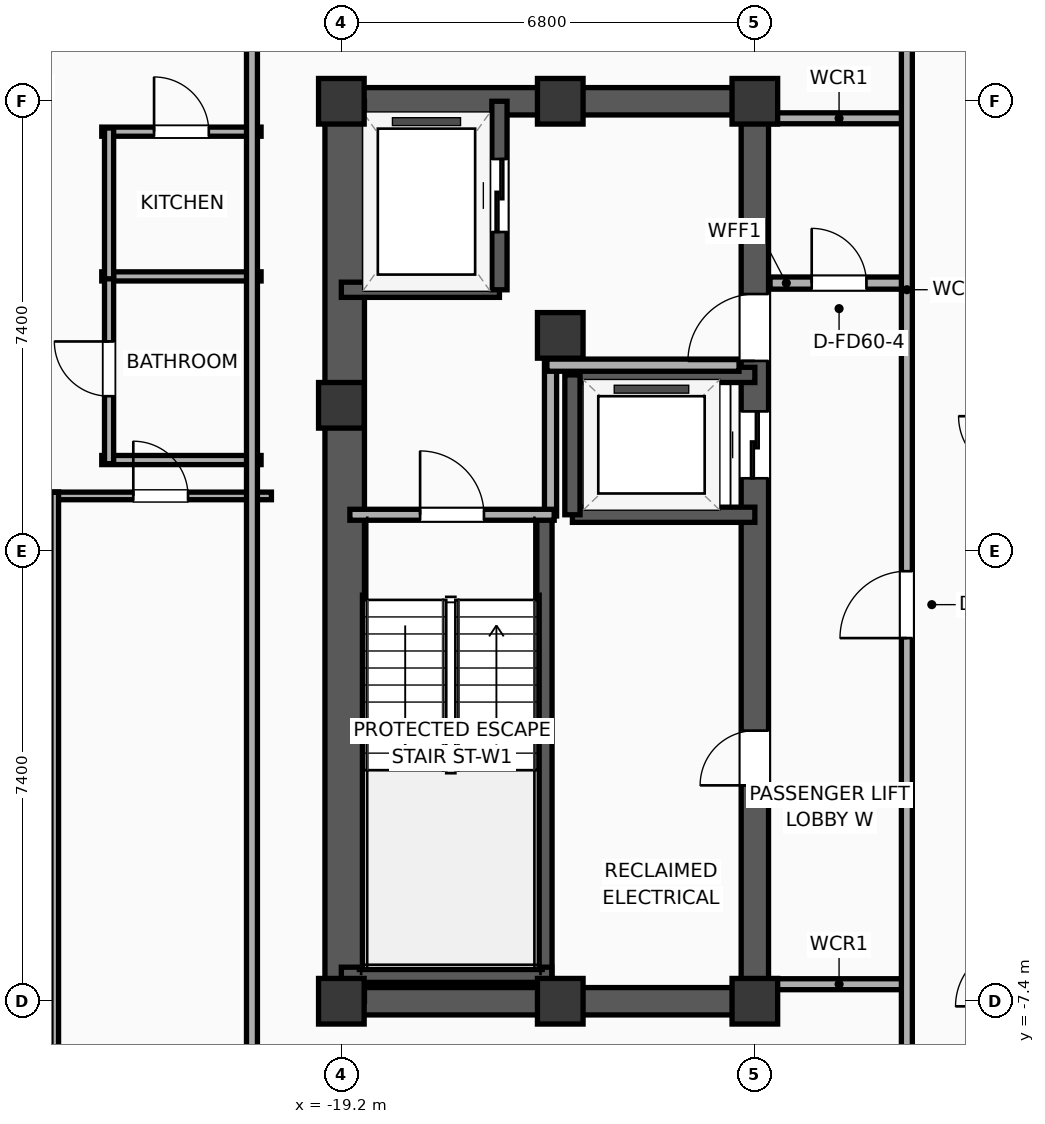
"""IFC4 building model, lengths in metres.
Left out: names, types, materials, properties, quantities, classifications, styles, units other than length and angle.
Written with IfcOpenShell. Run it as: python <this file> out.ifc"""

import sys

from ifc_helpers import new_model, si_unit, direction, frame, frame_2d, origin, origin_2d, place, context, subcontext, project, spatial, rectangle, extrude, element, fill, save


model = new_model("IFC4")
c1 = context("Model", 3, precision=1e-05, world=origin(), true_north=direction((0.0, 1.0)))
c2 = subcontext(c1, "Body", "Model", "MODEL_VIEW")
j1 = project(units=[si_unit("LENGTHUNIT", "METRE"), si_unit("PLANEANGLEUNIT", "RADIAN")], contexts=[c1])
p1 = place(None, origin())
s1 = spatial("IfcSite", under=j1, at=p1, CompositionType="ELEMENT")
p2 = place(p1, origin())
s2 = spatial("IfcBuilding", under=s1, at=p2, CompositionType="ELEMENT")
p3 = place(p2, frame((0.0, 0.0, 267.8)))
s3 = spatial("IfcBuildingStorey", under=s2, at=p3, CompositionType="ELEMENT", Elevation=267.8)
for number, where, z_axis, x_axis in (
    (1, (-19.2, -7.4, 0.0), (0.0, 0.0, 1.0), (1.0, 0.0, 0.0)),
    (2, (-19.2, 2.4, 0.0), (0.0, 0.0, 1.0), (1.0, 0.0, 0.0)),
    (3, (-19.2, 7.4, 0.0), (0.0, 0.0, 1.0), (1.0, 0.0, 0.0)),
    (4, (-15.6, -7.4, 0.0), (0.0, 0.0, 1.0), (1.0, 0.0, 0.0)),
    (5, (-15.6, 7.4, 0.0), (0.0, 0.0, 1.0), (1.0, 0.0, 0.0)),
    (6, (-12.4, -7.4, 0.0), (0.0, 0.0, 1.0), (1.0, 0.0, 0.0)),
    (7, (-15.6, 3.55, 0.0), (0.0, 0.0, 1.0), (1.0, 0.0, 0.0)),
    (8, (-12.4, 7.4, 0.0), (0.0, 0.0, 1.0), (1.0, 0.0, 0.0)),
):
    element("IfcColumn", number, at=place(p3, frame(where, z_axis=z_axis, x_axis=x_axis)), inside=s3, PredefinedType="COLUMN", context=c2, shape_type="SweptSolid", body=[
        extrude(rectangle(XDim=0.75, YDim=0.75, at=origin_2d()), origin(), (0.0, 0.0, 1.0), 3.9),
    ])
for number, where, z_axis, x_axis in (
    (9, (-19.425, -7.4, 0.0), (0.0, 0.0, 1.0), (1.0, 0.0, 0.0)),
    (10, (-19.425, 7.4, 0.0), (0.0, 0.0, 1.0), (1.0, 0.0, 0.0)),
):
    element("IfcWall", number, at=place(p3, frame(where, z_axis=z_axis, x_axis=x_axis)), inside=s3, PredefinedType="SHEAR", context=c2, shape_type="SweptSolid", body=[
        extrude(rectangle(XDim=7.25, YDim=0.45, at=frame_2d((3.625, 0.0))), origin(), (0.0, 0.0, 1.0), 3.65),
    ])
p4 = place(p3, frame((-19.145, -7.4, 0.0), z_axis=(0.0, 0.0, 1.0), x_axis=(0.0, 1.0, 0.0)))
e11 = element("IfcWall", 11, at=p4, inside=s3, PredefinedType="SHEAR", context=c2, shape_type="SweptSolid", body=[
    extrude(rectangle(XDim=14.8, YDim=0.65, at=frame_2d((7.4, 0.0))), origin(), (0.0, 0.0, 1.0), 3.65),
])
p5 = place(p3, frame((-12.4, -7.4, 0.0), z_axis=(0.0, 0.0, 1.0), x_axis=(0.0, 1.0, 0.0)))
e12 = element("IfcWall", 12, at=p5, inside=s3, PredefinedType="SHEAR", context=c2, shape_type="SweptSolid", body=[
    extrude(rectangle(XDim=14.8, YDim=0.45, at=frame_2d((7.4, 0.0))), origin(), (0.0, 0.0, 1.0), 3.65),
])
p6 = place(p5, frame((8.6, 0.0, 0.0)))
e13 = element("IfcOpeningElement", 13, at=p6, cuts=e12, PredefinedType="OPENING", context=c2, shape_type="SweptSolid", body=[
    extrude(rectangle(XDim=1.1, YDim=2.05, at=frame_2d((0.55, 1.025))), frame((0.0, 0.235, 0.0), z_axis=(0.0, -1.0, 0.0), x_axis=(1.0, 0.0, 0.0)), (0.0, 0.0, 1.0), 0.47),
])
p7 = place(p5, frame((10.53, 0.0, 0.0)))
e14 = element("IfcOpeningElement", 14, at=p7, cuts=e12, PredefinedType="OPENING", context=c2, shape_type="SweptSolid", body=[
    extrude(rectangle(XDim=1.1, YDim=2.05, at=frame_2d((0.55, 1.025))), frame((0.0, 0.235, 0.0), z_axis=(0.0, -1.0, 0.0), x_axis=(1.0, 0.0, 0.0)), (0.0, 0.0, 1.0), 0.47),
])
p8 = place(p5, frame((3.55, 0.0, 0.0)))
e15 = element("IfcOpeningElement", 15, at=p8, cuts=e12, PredefinedType="OPENING", context=c2, shape_type="SweptSolid", body=[
    extrude(rectangle(XDim=0.9, YDim=2.05, at=frame_2d((0.45, 1.025))), frame((0.0, 0.235, 0.0), z_axis=(0.0, -1.0, 0.0), x_axis=(1.0, 0.0, 0.0)), (0.0, 0.0, 1.0), 0.47),
])
p9 = place(p3, frame((-15.86, -7.085, 0.0), z_axis=(0.0, 0.0, 1.0), x_axis=(0.0, 1.0, 0.0)))
e16 = element("IfcWall", 16, at=p9, inside=s3, PredefinedType="SOLIDWALL", context=c2, shape_type="SweptSolid", body=[
    extrude(rectangle(XDim=7.685, YDim=0.25, at=frame_2d((3.843, 0.0))), origin(), (0.0, 0.0, 1.0), 3.65),
])
p10 = place(p3, frame((-19.2, -6.965, 0.0), z_axis=(0.0, 0.0, 1.0), x_axis=(1.0, 0.0, 0.0)))
e17 = element("IfcWall", 17, at=p10, inside=s3, PredefinedType="SOLIDWALL", context=c2, shape_type="SweptSolid", body=[
    extrude(rectangle(XDim=3.46, YDim=0.25, at=frame_2d((1.73, 0.0))), origin(), (0.0, 0.0, 1.0), 3.65),
])
p11 = place(p3, frame((-19.2, 4.3, 0.0), z_axis=(0.0, 0.0, 1.0), x_axis=(1.0, 0.0, 0.0)))
e18 = element("IfcWall", 18, at=p11, inside=s3, PredefinedType="SOLIDWALL", context=c2, shape_type="SweptSolid", body=[
    extrude(rectangle(XDim=2.6, YDim=0.25, at=frame_2d((1.3, 0.0))), origin(), (0.0, 0.0, 1.0), 3.65),
])
p12 = place(p3, frame((-16.6, 4.3, 0.0), z_axis=(0.0, 0.0, 1.0), x_axis=(0.0, 1.0, 0.0)))
e19 = element("IfcWall", 19, at=p12, inside=s3, PredefinedType="SOLIDWALL", context=c2, shape_type="SweptSolid", body=[
    extrude(rectangle(XDim=3.1, YDim=0.25, at=frame_2d((1.55, 0.0))), origin(), (0.0, 0.0, 1.0), 3.65),
])
p13 = place(p12, frame((0.95, 0.0, 0.0)))
e20 = element("IfcOpeningElement", 20, at=p13, cuts=e19, PredefinedType="OPENING", context=c2, shape_type="SweptSolid", body=[
    extrude(rectangle(XDim=1.2, YDim=2.05, at=frame_2d((0.6, 1.025))), frame((0.0, 0.135, 0.0), z_axis=(0.0, -1.0, 0.0), x_axis=(1.0, 0.0, 0.0)), (0.0, 0.0, 1.0), 0.27),
])
for number, where, z_axis, x_axis in (
    (21, (-15.4, 0.6, 0.0), (0.0, 0.0, 1.0), (1.0, 0.0, 0.0)),
    (22, (-12.4, 2.9, 0.0), (0.0, 0.0, 1.0), (-1.0, 0.0, 0.0)),
):
    element("IfcWall", number, at=place(p3, frame(where, z_axis=z_axis, x_axis=x_axis)), inside=s3, PredefinedType="SOLIDWALL", context=c2, shape_type="SweptSolid", body=[
        extrude(rectangle(XDim=3.0, YDim=0.25, at=frame_2d((1.5, 0.0))), origin(), (0.0, 0.0, 1.0), 3.65),
    ])
p14 = place(p3, frame((-15.4, 2.9, 0.0), z_axis=(0.0, 0.0, 1.0), x_axis=(0.0, -1.0, 0.0)))
e23 = element("IfcWall", 23, at=p14, inside=s3, PredefinedType="SOLIDWALL", context=c2, shape_type="SweptSolid", body=[
    extrude(rectangle(XDim=2.3, YDim=0.25, at=frame_2d((1.15, 0.0))), origin(), (0.0, 0.0, 1.0), 3.65),
])
p15 = place(p3, frame((-15.76, 0.58, 0.0), z_axis=(0.0, 0.0, 1.0), x_axis=(0.0, 1.0, 0.0)))
e24 = element("IfcWall", 24, at=p15, inside=s3, PredefinedType="PARTITIONING", context=c2, shape_type="SweptSolid", body=[
    extrude(rectangle(XDim=2.52, YDim=0.2, at=frame_2d((1.26, 0.0))), origin(), (0.0, 0.0, 1.0), 3.65),
])
p16 = place(p3, frame((-15.82, 3.06, 0.0), z_axis=(0.0, 0.0, 1.0), x_axis=(1.0, 0.0, 0.0)))
e25 = element("IfcWall", 25, at=p16, inside=s3, PredefinedType="PARTITIONING", context=c2, shape_type="SweptSolid", body=[
    extrude(rectangle(XDim=3.16, YDim=0.2, at=frame_2d((1.58, 0.0))), origin(), (0.0, 0.0, 1.0), 3.65),
])
p17 = place(p3, frame((-19.06, 0.6, 0.0), z_axis=(0.0, 0.0, 1.0), x_axis=(1.0, 0.0, 0.0)))
e26 = element("IfcWall", 26, at=p17, inside=s3, PredefinedType="PARTITIONING", context=c2, shape_type="SweptSolid", body=[
    extrude(rectangle(XDim=3.36, YDim=0.18, at=frame_2d((1.68, 0.0))), origin(), (0.0, 0.0, 1.0), 3.65),
])
p18 = place(p17, frame((1.155, 0.0, 0.0)))
e27 = element("IfcOpeningElement", 27, at=p18, cuts=e26, PredefinedType="OPENING", context=c2, shape_type="SweptSolid", body=[
    extrude(rectangle(XDim=1.05, YDim=2.05, at=frame_2d((0.525, 1.025))), frame((0.0, 0.1, 0.0), z_axis=(0.0, -1.0, 0.0), x_axis=(1.0, 0.0, 0.0)), (0.0, 0.0, 1.0), 0.2),
])
p19 = place(p3, frame((-12.15, 4.41, 0.0), z_axis=(0.0, 0.0, 1.0), x_axis=(1.0, 0.0, 0.0)))
e28 = element("IfcWall", 28, at=p19, inside=s3, PredefinedType="PARTITIONING", context=c2, shape_type="SweptSolid", body=[
    extrude(rectangle(XDim=2.27, YDim=0.2, at=frame_2d((1.135, 0.0))), origin(), (0.0, 0.0, 1.0), 3.65),
])
p20 = place(p19, frame((0.685, 0.0, 0.0)))
e29 = element("IfcOpeningElement", 29, at=p20, cuts=e28, PredefinedType="OPENING", context=c2, shape_type="SweptSolid", body=[
    extrude(rectangle(XDim=0.9, YDim=2.05, at=frame_2d((0.45, 1.025))), frame((0.0, 0.11, 0.0), z_axis=(0.0, -1.0, 0.0), x_axis=(1.0, 0.0, 0.0)), (0.0, 0.0, 1.0), 0.22),
])
for number, where, z_axis, x_axis in (
    (30, (-12.15, 7.12, 0.0), (0.0, 0.0, 1.0), (1.0, 0.0, 0.0)),
    (31, (-12.15, -7.12, 0.0), (0.0, 0.0, 1.0), (1.0, 0.0, 0.0)),
):
    element("IfcWall", number, at=place(p3, frame(where, z_axis=z_axis, x_axis=x_axis)), inside=s3, PredefinedType="PARTITIONING", context=c2, shape_type="SweptSolid", body=[
        extrude(rectangle(XDim=2.27, YDim=0.18, at=frame_2d((1.135, 0.0))), origin(), (0.0, 0.0, 1.0), 3.65),
    ])
p21 = place(p3, frame((-9.9, -8.78, 0.0), z_axis=(0.0, 0.0, 1.0), x_axis=(0.0, 1.0, 0.0)))
e32 = element("IfcWall", 32, at=p21, inside=s3, PredefinedType="PARTITIONING", context=c2, shape_type="SweptSolid", body=[
    extrude(rectangle(XDim=17.56, YDim=0.18, at=frame_2d((8.78, 0.0))), origin(), (0.0, 0.0, 1.0), 3.65),
])
p22 = place(p21, frame((7.352, 0.0, 0.0)))
e33 = element("IfcOpeningElement", 33, at=p22, cuts=e32, PredefinedType="OPENING", context=c2, shape_type="SweptSolid", body=[
    extrude(rectangle(XDim=1.1, YDim=2.05, at=frame_2d((0.55, 1.025))), frame((0.0, 0.1, 0.0), z_axis=(0.0, -1.0, 0.0), x_axis=(1.0, 0.0, 0.0)), (0.0, 0.0, 1.0), 0.2),
])
p23 = place(p3, frame((-23.14, 6.9, 0.0), z_axis=(0.0, 0.0, 1.0), x_axis=(1.0, 0.0, 0.0)))
e34 = element("IfcWall", 34, at=p23, inside=s3, PredefinedType="PLUMBINGWALL", context=c2, shape_type="SweptSolid", body=[
    extrude(rectangle(XDim=2.62, YDim=0.15, at=frame_2d((1.31, 0.0))), origin(), (0.0, 0.0, 1.0), 3.65),
])
p24 = place(p23, frame((0.86, 0.0, 0.0)))
e35 = element("IfcOpeningElement", 35, at=p24, cuts=e34, PredefinedType="OPENING", context=c2, shape_type="SweptSolid", body=[
    extrude(rectangle(XDim=0.9, YDim=2.05, at=frame_2d((0.45, 1.025))), frame((0.0, 0.085, 0.0), z_axis=(0.0, -1.0, 0.0), x_axis=(1.0, 0.0, 0.0)), (0.0, 0.0, 1.0), 0.17),
])
for number, where, z_axis, x_axis in (
    (36, (-23.14, 4.52, 0.0), (0.0, 0.0, 1.0), (1.0, 0.0, 0.0)),
    (37, (-23.14, 1.5, 0.0), (0.0, 0.0, 1.0), (1.0, 0.0, 0.0)),
):
    element("IfcWall", number, at=place(p3, frame(where, z_axis=z_axis, x_axis=x_axis)), inside=s3, PredefinedType="PLUMBINGWALL", context=c2, shape_type="SweptSolid", body=[
        extrude(rectangle(XDim=2.62, YDim=0.15, at=frame_2d((1.31, 0.0))), origin(), (0.0, 0.0, 1.0), 3.65),
    ])
p25 = place(p3, frame((-23.02, 1.44, 0.0), z_axis=(0.0, 0.0, 1.0), x_axis=(0.0, 1.0, 0.0)))
e38 = element("IfcWall", 38, at=p25, inside=s3, PredefinedType="PLUMBINGWALL", context=c2, shape_type="SweptSolid", body=[
    extrude(rectangle(XDim=3.12, YDim=0.15, at=frame_2d((1.56, 0.0))), origin(), (0.0, 0.0, 1.0), 3.65),
])
p26 = place(p25, frame((1.11, 0.0, 0.0)))
e39 = element("IfcOpeningElement", 39, at=p26, cuts=e38, PredefinedType="OPENING", context=c2, shape_type="SweptSolid", body=[
    extrude(rectangle(XDim=0.9, YDim=2.05, at=frame_2d((0.45, 1.025))), frame((0.0, 0.085, 0.0), z_axis=(0.0, -1.0, 0.0), x_axis=(1.0, 0.0, 0.0)), (0.0, 0.0, 1.0), 0.17),
])
p27 = place(p3, frame((-23.02, 4.48, 0.0), z_axis=(0.0, 0.0, 1.0), x_axis=(0.0, 1.0, 0.0)))
e40 = element("IfcWall", 40, at=p27, inside=s3, PredefinedType="PLUMBINGWALL", context=c2, shape_type="SweptSolid", body=[
    extrude(rectangle(XDim=2.48, YDim=0.15, at=frame_2d((1.24, 0.0))), origin(), (0.0, 0.0, 1.0), 3.65),
])
p28 = place(p3, frame((-27.219, 0.91, 0.0), z_axis=(0.0, 0.0, 1.0), x_axis=(1.0, 0.0, 0.0)))
e41 = element("IfcWall", 41, at=p28, inside=s3, PredefinedType="PARTITIONING", context=c2, shape_type="SweptSolid", body=[
    extrude(rectangle(XDim=3.368, YDim=0.125, at=frame_2d((1.684, 0.0))), origin(), (0.0, 0.0, 1.0), 3.65),
])
p29 = place(p28, frame((1.234, 0.0, 0.0)))
e42 = element("IfcOpeningElement", 42, at=p29, cuts=e41, PredefinedType="OPENING", context=c2, shape_type="SweptSolid", body=[
    extrude(rectangle(XDim=0.9, YDim=2.05, at=frame_2d((0.45, 1.025))), frame((0.0, 0.073, 0.0), z_axis=(0.0, -1.0, 0.0), x_axis=(1.0, 0.0, 0.0)), (0.0, 0.0, 1.0), 0.145),
])
p30 = place(p3, frame((-23.976, 0.91, 0.0), z_axis=(0.0, 0.0, 1.0), x_axis=(1.0, 0.0, 0.0)))
e43 = element("IfcWall", 43, at=p30, inside=s3, PredefinedType="PARTITIONING", context=c2, shape_type="SweptSolid", body=[
    extrude(rectangle(XDim=3.625, YDim=0.125, at=frame_2d((1.813, 0.0))), origin(), (0.0, 0.0, 1.0), 3.65),
])
p31 = place(p30, frame((1.354, 0.0, 0.0)))
e44 = element("IfcOpeningElement", 44, at=p31, cuts=e43, PredefinedType="OPENING", context=c2, shape_type="SweptSolid", body=[
    extrude(rectangle(XDim=0.9, YDim=2.05, at=frame_2d((0.45, 1.025))), frame((0.0, 0.073, 0.0), z_axis=(0.0, -1.0, 0.0), x_axis=(1.0, 0.0, 0.0)), (0.0, 0.0, 1.0), 0.145),
])
p32 = place(p3, frame((-23.913, -9.01, 0.0), z_axis=(0.0, 0.0, 1.0), x_axis=(0.0, 1.0, 0.0)))
e45 = element("IfcWall", 45, at=p32, inside=s3, PredefinedType="PARTITIONING", context=c2, shape_type="SweptSolid", body=[
    extrude(rectangle(XDim=9.98, YDim=0.125, at=frame_2d((4.99, 0.0))), origin(), (0.0, 0.0, 1.0), 3.65),
])
p33 = place(p3, frame((-20.67, -8.81, 0.0), z_axis=(0.0, 0.0, 1.0), x_axis=(0.0, 1.0, 0.0)))
e46 = element("IfcWall", 46, at=p33, inside=s3, PredefinedType="PARTITIONING", context=c2, shape_type="SweptSolid", body=[
    extrude(rectangle(XDim=17.62, YDim=0.18, at=frame_2d((8.81, 0.0))), origin(), (0.0, 0.0, 1.0), 3.65),
])
p34 = place(p13, origin())
e47 = element("IfcDoor", 47, at=p34, inside=s3, OperationType="SLIDING_TO_LEFT", PredefinedType="DOOR", context=c2, shape_type="SweptSolid", body=[
    extrude(rectangle(XDim=1.2, YDim=2.05, at=frame_2d((0.6, 1.025))), frame((0.0, 0.025, 0.0), z_axis=(0.0, -1.0, 0.0), x_axis=(1.0, 0.0, 0.0)), (0.0, 0.0, 1.0), 0.05),
])
fill(e20, e47)
p35 = place(p6, origin())
e48 = element("IfcDoor", 48, at=p35, inside=s3, OperationType="SLIDING_TO_LEFT", PredefinedType="DOOR", context=c2, shape_type="SweptSolid", body=[
    extrude(rectangle(XDim=1.1, YDim=2.05, at=frame_2d((0.55, 1.025))), frame((0.0, 0.025, 0.0), z_axis=(0.0, -1.0, 0.0), x_axis=(1.0, 0.0, 0.0)), (0.0, 0.0, 1.0), 0.05),
])
fill(e13, e48)
p36 = place(p18, origin())
e49 = element("IfcDoor", 49, at=p36, inside=s3, OperationType="SINGLE_SWING_LEFT", PredefinedType="DOOR", context=c2, shape_type="SweptSolid", body=[
    extrude(rectangle(XDim=1.05, YDim=2.05, at=frame_2d((0.525, 1.025))), frame((0.0, 0.025, 0.0), z_axis=(0.0, -1.0, 0.0), x_axis=(1.0, 0.0, 0.0)), (0.0, 0.0, 1.0), 0.05),
])
fill(e27, e49)
p37 = place(p20, origin())
e50 = element("IfcDoor", 50, at=p37, inside=s3, OperationType="SINGLE_SWING_LEFT", PredefinedType="DOOR", context=c2, shape_type="SweptSolid", body=[
    extrude(rectangle(XDim=0.9, YDim=2.05, at=frame_2d((0.45, 1.025))), frame((0.0, 0.025, 0.0), z_axis=(0.0, -1.0, 0.0), x_axis=(1.0, 0.0, 0.0)), (0.0, 0.0, 1.0), 0.05),
])
fill(e29, e50)
p38 = place(p22, origin())
e51 = element("IfcDoor", 51, at=p38, inside=s3, OperationType="SINGLE_SWING_LEFT", PredefinedType="DOOR", context=c2, shape_type="SweptSolid", body=[
    extrude(rectangle(XDim=1.1, YDim=2.05, at=frame_2d((0.55, 1.025))), frame((0.0, 0.025, 0.0), z_axis=(0.0, -1.0, 0.0), x_axis=(1.0, 0.0, 0.0)), (0.0, 0.0, 1.0), 0.05),
])
fill(e33, e51)
p39 = place(p24, origin())
e52 = element("IfcDoor", 52, at=p39, inside=s3, OperationType="SINGLE_SWING_LEFT", PredefinedType="DOOR", context=c2, shape_type="SweptSolid", body=[
    extrude(rectangle(XDim=0.9, YDim=2.05, at=frame_2d((0.45, 1.025))), frame((0.0, 0.025, 0.0), z_axis=(0.0, -1.0, 0.0), x_axis=(1.0, 0.0, 0.0)), (0.0, 0.0, 1.0), 0.05),
])
fill(e35, e52)
p40 = place(p26, origin())
e53 = element("IfcDoor", 53, at=p40, inside=s3, OperationType="SINGLE_SWING_RIGHT", PredefinedType="DOOR", context=c2, shape_type="SweptSolid", body=[
    extrude(rectangle(XDim=0.9, YDim=2.05, at=frame_2d((0.45, 1.025))), frame((0.0, 0.025, 0.0), z_axis=(0.0, -1.0, 0.0), x_axis=(1.0, 0.0, 0.0)), (0.0, 0.0, 1.0), 0.05),
])
fill(e39, e53)
p41 = place(p31, origin())
e54 = element("IfcDoor", 54, at=p41, inside=s3, OperationType="SINGLE_SWING_LEFT", PredefinedType="DOOR", context=c2, shape_type="SweptSolid", body=[
    extrude(rectangle(XDim=0.9, YDim=2.05, at=frame_2d((0.45, 1.025))), frame((0.0, 0.025, 0.0), z_axis=(0.0, -1.0, 0.0), x_axis=(1.0, 0.0, 0.0)), (0.0, 0.0, 1.0), 0.05),
])
fill(e44, e54)
p42 = place(p7, origin())
e55 = element("IfcDoor", 55, at=p42, inside=s3, OperationType="SINGLE_SWING_LEFT", PredefinedType="DOOR", context=c2, shape_type="SweptSolid", body=[
    extrude(rectangle(XDim=1.1, YDim=2.05, at=frame_2d((0.55, 1.025))), frame((0.0, 0.025, 0.0), z_axis=(0.0, -1.0, 0.0), x_axis=(1.0, 0.0, 0.0)), (0.0, 0.0, 1.0), 0.05),
])
fill(e14, e55)
p43 = place(p8, origin())
e56 = element("IfcDoor", 56, at=p43, inside=s3, OperationType="SINGLE_SWING_LEFT", PredefinedType="DOOR", context=c2, shape_type="SweptSolid", body=[
    extrude(rectangle(XDim=0.9, YDim=2.05, at=frame_2d((0.45, 1.025))), frame((0.0, 0.025, 0.0), z_axis=(0.0, -1.0, 0.0), x_axis=(1.0, 0.0, 0.0)), (0.0, 0.0, 1.0), 0.05),
])
fill(e15, e56)
save(model, sys.argv[1])
